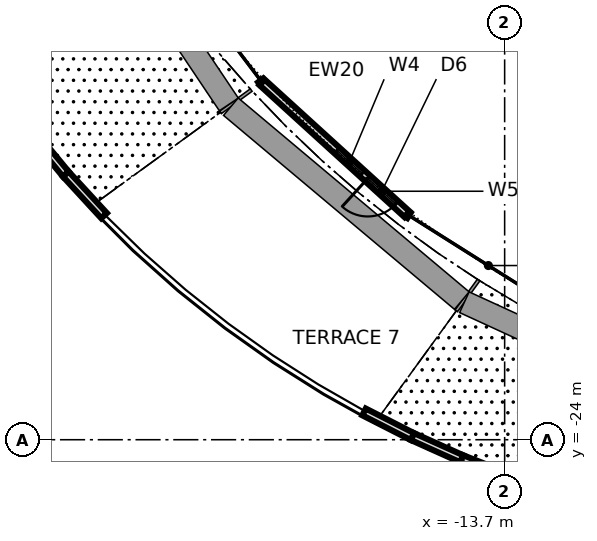
"""IFC4 building model, lengths in metres.
Left out: names, types, materials, properties, quantities, classifications, styles, units other than length and angle.
Written with IfcOpenShell. Run it as: python <this file> out.ifc"""

import sys

from ifc_helpers import new_model, si_unit, direction, frame, frame_2d, origin, place, context, subcontext, project, spatial, rectangle, extrude, element, fill, save


model = new_model("IFC4")
c1 = context("Model", 3, precision=1e-05, world=origin(), true_north=direction((0.0, 1.0)))
c2 = subcontext(c1, "Body", "Model", "MODEL_VIEW")
j1 = project(units=[si_unit("LENGTHUNIT", "METRE"), si_unit("PLANEANGLEUNIT", "RADIAN")], contexts=[c1])
p1 = place(None, origin())
s1 = spatial("IfcSite", under=j1, at=p1, CompositionType="ELEMENT")
p2 = place(p1, origin())
s2 = spatial("IfcBuilding", under=s1, at=p2, CompositionType="ELEMENT")
p3 = place(p2, frame((0.0, 0.0, 19.6)))
s3 = spatial("IfcBuildingStorey", under=s2, at=p3, CompositionType="ELEMENT", Elevation=19.6)
p4 = place(p3, frame((-20.085, -14.593, 0.0), z_axis=(0.0, 0.0, 1.0), x_axis=(0.739597549154, -0.673049378044, 0.0)))
e1 = element("IfcWall", 1, at=p4, inside=s3, PredefinedType="SOLIDWALL", context=c2, shape_type="SweptSolid", body=[
    extrude(rectangle(XDim=5.162, YDim=0.2, at=frame_2d((2.581, 0.0))), origin(), (0.0, 0.0, 1.0), 4.04),
])
p5 = place(p4, frame((3.762, 0.0, 0.0)))
e2 = element("IfcOpeningElement", 2, at=p5, cuts=e1, PredefinedType="OPENING", context=c2, shape_type="SweptSolid", body=[
    extrude(rectangle(XDim=1.0, YDim=2.4, at=frame_2d((0.5, 1.2))), frame((0.0, 0.11, 0.0), z_axis=(0.0, -1.0, 0.0), x_axis=(1.0, 0.0, 0.0)), (0.0, 0.0, 1.0), 0.22),
])
p6 = place(p4, frame((2.662, 0.0, 0.3)))
e3 = element("IfcOpeningElement", 3, at=p6, cuts=e1, PredefinedType="OPENING", context=c2, shape_type="SweptSolid", body=[
    extrude(rectangle(XDim=0.9, YDim=2.1, at=frame_2d((0.45, 1.05))), frame((0.0, 0.11, 0.0), z_axis=(0.0, -1.0, 0.0), x_axis=(1.0, 0.0, 0.0)), (0.0, 0.0, 1.0), 0.22),
])
p7 = place(p4, frame((3.762, 0.0, 2.7)))
e4 = element("IfcOpeningElement", 4, at=p7, cuts=e1, PredefinedType="OPENING", context=c2, shape_type="SweptSolid", body=[
    extrude(rectangle(XDim=1.0, YDim=0.6, at=frame_2d((0.5, 0.3))), frame((0.0, 0.11, 0.0), z_axis=(0.0, -1.0, 0.0), x_axis=(1.0, 0.0, 0.0)), (0.0, 0.0, 1.0), 0.22),
])
p8 = place(p3, frame((-26.197, -15.857, 0.0), z_axis=(0.0, 0.0, 1.0), x_axis=(0.636010862813, -0.77168010366, 0.0)))
e5 = element("IfcWall", 5, at=p8, inside=s3, PredefinedType="PARAPET", context=c2, shape_type="SweptSolid", body=[
    extrude(rectangle(XDim=1.494, YDim=0.2, at=frame_2d((0.747, 0.0))), origin(), (0.0, 0.0, 1.0), 1.1),
])
p9 = place(p3, frame((-25.247, -17.01, 0.0), z_axis=(0.0, 0.0, 1.0), x_axis=(0.677003144742, -0.735980123379, 0.0)))
e6 = element("IfcWall", 6, at=p9, inside=s3, PredefinedType="PARAPET", context=c2, shape_type="SweptSolid", body=[
    extrude(rectangle(XDim=1.486, YDim=0.2, at=frame_2d((0.743, 0.0))), origin(), (0.0, 0.0, 1.0), 1.1),
])
p10 = place(p3, frame((-17.399, -23.269, 0.0), z_axis=(0.0, 0.0, 1.0), x_axis=(0.891022565174, -0.453959016158, 0.0)))
e7 = element("IfcWall", 7, at=p10, inside=s3, PredefinedType="PARAPET", context=c2, shape_type="SweptSolid", body=[
    extrude(rectangle(XDim=1.431, YDim=0.2, at=frame_2d((0.715, 0.0))), origin(), (0.0, 0.0, 1.0), 1.1),
])
p11 = place(p3, frame((-16.125, -23.918, 0.0), z_axis=(0.0, 0.0, 1.0), x_axis=(0.911966522965, -0.410264623128, 0.0)))
e8 = element("IfcWall", 8, at=p11, inside=s3, PredefinedType="PARAPET", context=c2, shape_type="SweptSolid", body=[
    extrude(rectangle(XDim=1.42, YDim=0.2, at=frame_2d((0.71, 0.0))), origin(), (0.0, 0.0, 1.0), 1.1),
])
p12 = place(p3, frame((-14.829, -24.501, 0.0), z_axis=(0.0, 0.0, 1.0), x_axis=(0.930505000792, -0.366279187917, 0.0)))
e9 = element("IfcWall", 9, at=p12, inside=s3, PredefinedType="PARAPET", context=c2, shape_type="SweptSolid", body=[
    extrude(rectangle(XDim=1.41, YDim=0.2, at=frame_2d((0.705, 0.0))), origin(), (0.0, 0.0, 1.0), 1.1),
])
p13 = place(p5, frame((1.0, 0.0, 0.0), z_axis=(0.0, 0.0, 1.0), x_axis=(-1.0, 0.0, 0.0)))
e10 = element("IfcDoor", 10, at=p13, inside=s3, OperationType="SINGLE_SWING_RIGHT", PredefinedType="DOOR", context=c2, shape_type="SweptSolid", body=[
    extrude(rectangle(XDim=1.0, YDim=2.4, at=frame_2d((0.5, 1.2))), frame((0.0, 0.025, 0.0), z_axis=(0.0, -1.0, 0.0), x_axis=(1.0, 0.0, 0.0)), (0.0, 0.0, 1.0), 0.05),
])
fill(e2, e10)
p14 = place(p6, origin())
e11 = element("IfcWindow", 11, at=p14, inside=s3, PartitioningType="SINGLE_PANEL", PredefinedType="WINDOW", context=c2, shape_type="SweptSolid", body=[
    extrude(rectangle(XDim=0.9, YDim=2.1, at=frame_2d((0.45, 1.05))), frame((0.0, 0.03, 0.0), z_axis=(0.0, -1.0, 0.0), x_axis=(1.0, 0.0, 0.0)), (0.0, 0.0, 1.0), 0.06),
])
fill(e3, e11)
p15 = place(p7, origin())
e12 = element("IfcWindow", 12, at=p15, inside=s3, PartitioningType="SINGLE_PANEL", PredefinedType="WINDOW", context=c2, shape_type="SweptSolid", body=[
    extrude(rectangle(XDim=1.0, YDim=0.6, at=frame_2d((0.5, 0.3))), frame((0.0, 0.03, 0.0), z_axis=(0.0, -1.0, 0.0), x_axis=(1.0, 0.0, 0.0)), (0.0, 0.0, 1.0), 0.06),
])
fill(e4, e12)
save(model, sys.argv[1])
